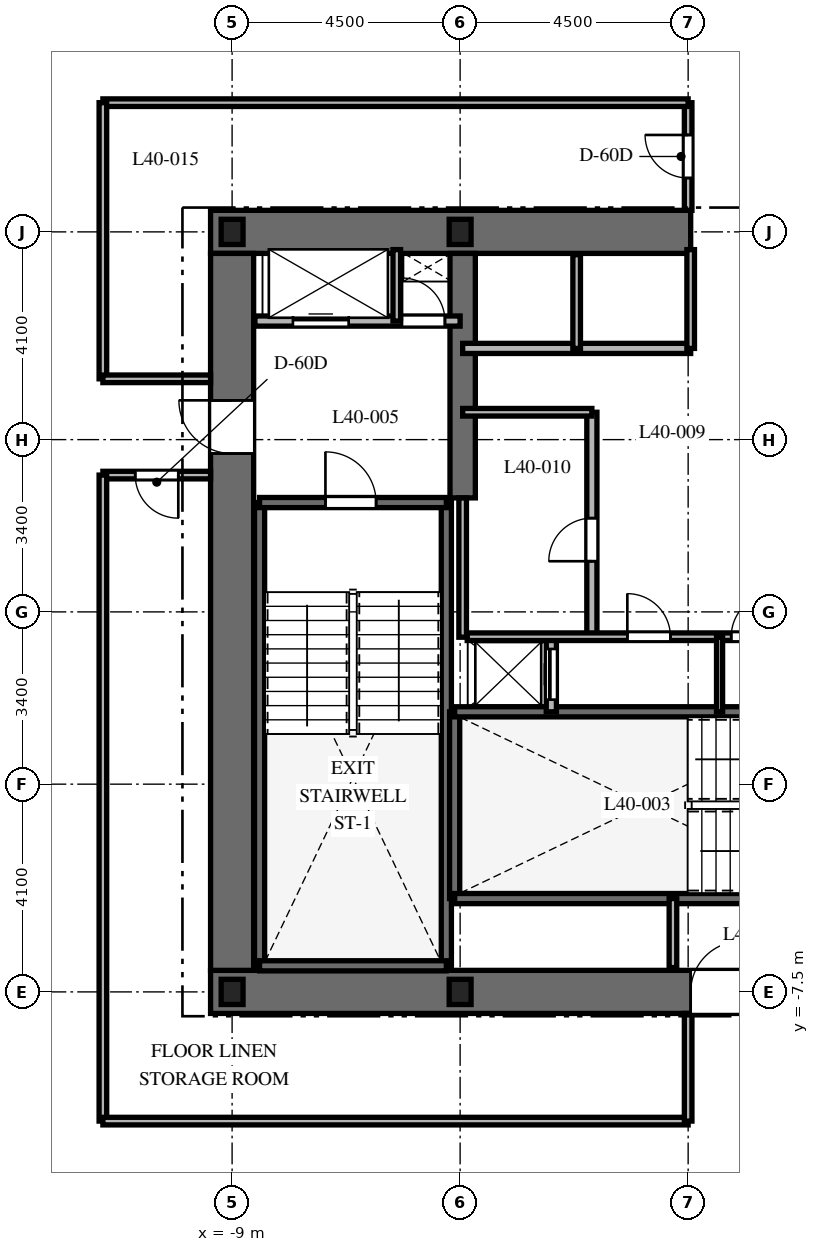
"""IFC4 building model, lengths in metres.
Left out: names, types, materials, properties, quantities, classifications, styles, units other than length and angle.
Written with IfcOpenShell. Run it as: python <this file> out.ifc"""

import sys

from ifc_helpers import new_model, si_unit, direction, frame, frame_2d, origin, origin_2d, place, context, subcontext, project, spatial, rectangle, i_section, extrude, element, fill, save


model = new_model("IFC4")
c1 = context("Model", 3, precision=1e-05, world=origin(), true_north=direction((0.0, 1.0)))
c2 = subcontext(c1, "Body", "Model", "MODEL_VIEW")
j1 = project(units=[si_unit("LENGTHUNIT", "METRE"), si_unit("PLANEANGLEUNIT", "RADIAN")], contexts=[c1])
p1 = place(None, origin())
s1 = spatial("IfcSite", under=j1, at=p1, CompositionType="ELEMENT")
p2 = place(p1, origin())
s2 = spatial("IfcBuilding", under=s1, at=p2, CompositionType="ELEMENT")
p3 = place(p2, frame((0.0, 0.0, 162.8)))
s3 = spatial("IfcBuildingStorey", under=s2, at=p3, CompositionType="ELEMENT", Elevation=162.8)
p4 = place(p3, frame((-9.425, -7.5, 0.0), z_axis=(0.0, 0.0, 1.0), x_axis=(1.0, 0.0, 0.0)))
e1 = element("IfcWall", 1, at=p4, inside=s3, PredefinedType="SHEAR", context=c2, shape_type="SweptSolid", body=[
    extrude(rectangle(XDim=18.85, YDim=0.85, at=frame_2d((9.425, 0.0))), origin(), (0.0, 0.0, 1.0), 3.7),
])
p5 = place(p4, frame((9.475, 0.0, 0.0)))
e2 = element("IfcOpeningElement", 2, at=p5, cuts=e1, PredefinedType="OPENING", context=c2, shape_type="SweptSolid", body=[
    extrude(rectangle(XDim=1.0, YDim=2.15, at=frame_2d((0.5, 1.075))), frame((0.0, 0.435, 0.0), z_axis=(0.0, -1.0, 0.0), x_axis=(1.0, 0.0, 0.0)), (0.0, 0.0, 1.0), 0.87),
])
p6 = place(p3, frame((-9.425, 7.5, 0.0), z_axis=(0.0, 0.0, 1.0), x_axis=(1.0, 0.0, 0.0)))
e3 = element("IfcWall", 3, at=p6, inside=s3, PredefinedType="SHEAR", context=c2, shape_type="SweptSolid", body=[
    extrude(rectangle(XDim=9.475, YDim=0.85, at=frame_2d((4.738, 0.0))), origin(), (0.0, 0.0, 1.0), 3.7),
])
p7 = place(p3, frame((-9.0, -7.075, 0.0), z_axis=(0.0, 0.0, 1.0), x_axis=(0.0, 1.0, 0.0)))
e4 = element("IfcWall", 4, at=p7, inside=s3, PredefinedType="SHEAR", context=c2, shape_type="SweptSolid", body=[
    extrude(rectangle(XDim=14.15, YDim=0.85, at=frame_2d((7.075, 0.0))), origin(), (0.0, 0.0, 1.0), 3.7),
])
p8 = place(p7, frame((10.2, 0.0, 0.0)))
e5 = element("IfcOpeningElement", 5, at=p8, cuts=e4, PredefinedType="OPENING", context=c2, shape_type="SweptSolid", body=[
    extrude(rectangle(XDim=1.05, YDim=2.15, at=frame_2d((0.525, 1.075))), frame((0.0, 0.435, 0.0), z_axis=(0.0, -1.0, 0.0), x_axis=(1.0, 0.0, 0.0)), (0.0, 0.0, 1.0), 0.87),
])
p9 = place(p3, frame((-4.45, 2.25, 0.0), z_axis=(0.0, 0.0, 1.0), x_axis=(0.0, 1.0, 0.0)))
e6 = element("IfcWall", 6, at=p9, inside=s3, PredefinedType="SHEAR", context=c2, shape_type="SweptSolid", body=[
    extrude(rectangle(XDim=4.825, YDim=0.5, at=frame_2d((2.413, 0.0))), origin(), (0.0, 0.0, 1.0), 3.7),
])
for number, where, z_axis, x_axis in (
    (7, (-8.458, -6.985, 0.0), (0.0, 0.0, 1.0), (0.0, 1.0, 0.0)),
    (8, (-4.772, -6.985, 0.0), (0.0, 0.0, 1.0), (0.0, 1.0, 0.0)),
):
    element("IfcWall", number, at=place(p3, frame(where, z_axis=z_axis, x_axis=x_axis)), inside=s3, PredefinedType="SHEAR", context=c2, shape_type="SweptSolid", body=[
        extrude(rectangle(XDim=9.143, YDim=0.2, at=frame_2d((4.572, 0.0))), origin(), (0.0, 0.0, 1.0), 3.7),
    ])
p10 = place(p3, frame((-8.458, -6.985, 0.0), z_axis=(0.0, 0.0, 1.0), x_axis=(1.0, 0.0, 0.0)))
e9 = element("IfcWall", 9, at=p10, inside=s3, PredefinedType="SHEAR", context=c2, shape_type="SweptSolid", body=[
    extrude(rectangle(XDim=3.686, YDim=0.2, at=frame_2d((1.843, 0.0))), origin(), (0.0, 0.0, 1.0), 3.7),
])
p11 = place(p3, frame((-8.458, 2.158, 0.0), z_axis=(0.0, 0.0, 1.0), x_axis=(1.0, 0.0, 0.0)))
e10 = element("IfcWall", 10, at=p11, inside=s3, PredefinedType="SHEAR", context=c2, shape_type="SweptSolid", body=[
    extrude(rectangle(XDim=3.686, YDim=0.2, at=frame_2d((1.843, 0.0))), origin(), (0.0, 0.0, 1.0), 3.7),
])
p12 = place(p11, frame((1.3, 0.0, 0.0)))
e11 = element("IfcOpeningElement", 11, at=p12, cuts=e10, PredefinedType="OPENING", context=c2, shape_type="SweptSolid", body=[
    extrude(rectangle(XDim=1.0, YDim=2.15, at=frame_2d((0.5, 1.075))), frame((0.0, 0.11, 0.0), z_axis=(0.0, -1.0, 0.0), x_axis=(1.0, 0.0, 0.0)), (0.0, 0.0, 1.0), 0.22),
])
p13 = place(p3, frame((-4.608, -5.658, 0.0), z_axis=(0.0, 0.0, 1.0), x_axis=(0.0, 1.0, 0.0)))
e12 = element("IfcWall", 12, at=p13, inside=s3, PredefinedType="SHEAR", context=c2, shape_type="SweptSolid", body=[
    extrude(rectangle(XDim=3.686, YDim=0.2, at=frame_2d((1.843, 0.0))), origin(), (0.0, 0.0, 1.0), 3.7),
])
p14 = place(p3, frame((-4.608, -5.658, 0.0), z_axis=(0.0, 0.0, 1.0), x_axis=(1.0, 0.0, 0.0)))
e13 = element("IfcWall", 13, at=p14, inside=s3, PredefinedType="SHEAR", context=c2, shape_type="SweptSolid", body=[
    extrude(rectangle(XDim=9.166, YDim=0.2, at=frame_2d((4.583, 0.0))), origin(), (0.0, 0.0, 1.0), 3.7),
])
p15 = place(p14, frame((7.45, 0.0, 0.0)))
e14 = element("IfcOpeningElement", 14, at=p15, cuts=e13, PredefinedType="OPENING", context=c2, shape_type="SweptSolid", body=[
    extrude(rectangle(XDim=1.0, YDim=2.15, at=frame_2d((0.5, 1.075))), frame((0.0, 0.11, 0.0), z_axis=(0.0, -1.0, 0.0), x_axis=(1.0, 0.0, 0.0)), (0.0, 0.0, 1.0), 0.22),
])
p16 = place(p3, frame((-4.608, -1.972, 0.0), z_axis=(0.0, 0.0, 1.0), x_axis=(1.0, 0.0, 0.0)))
e15 = element("IfcWall", 15, at=p16, inside=s3, PredefinedType="SHEAR", context=c2, shape_type="SweptSolid", body=[
    extrude(rectangle(XDim=9.166, YDim=0.2, at=frame_2d((4.583, 0.0))), origin(), (0.0, 0.0, 1.0), 3.7),
])
for number, where, z_axis, x_axis in (
    (16, (-9.0, -7.5, 0.0), (0.0, 0.0, 1.0), (1.0, 0.0, 0.0)),
    (17, (-4.5, -7.5, 0.0), (0.0, 0.0, 1.0), (1.0, 0.0, 0.0)),
    (18, (-4.5, 7.5, 0.0), (0.0, 0.0, 1.0), (1.0, 0.0, 0.0)),
    (19, (-9.0, 7.5, 0.0), (0.0, 0.0, 1.0), (1.0, 0.0, 0.0)),
):
    element("IfcColumn", number, at=place(p3, frame(where, z_axis=z_axis, x_axis=x_axis)), inside=s3, PredefinedType="COLUMN", context=c2, shape_type="SweptSolid", body=[
        extrude(i_section(OverallWidth=0.432, OverallDepth=0.498, WebThickness=0.056, FlangeThickness=0.089, at=origin_2d()), origin(), (0.0, 0.0, 1.0), 3.7),
    ])
p17 = place(p3, frame((-0.3, -7.02, 0.0), z_axis=(0.0, 0.0, 1.0), x_axis=(0.0, 1.0, 0.0)))
e20 = element("IfcWall", 20, at=p17, inside=s3, PredefinedType="PARTITIONING", context=c2, shape_type="SweptSolid", body=[
    extrude(rectangle(XDim=1.362, YDim=0.15, at=frame_2d((0.681, 0.0))), origin(), (0.0, 0.0, 1.0), 3.4),
])
p18 = place(p3, frame((-8.55, 5.74, 0.0), z_axis=(0.0, 0.0, 1.0), x_axis=(1.0, 0.0, 0.0)))
e21 = element("IfcWall", 21, at=p18, inside=s3, PredefinedType="PARTITIONING", context=c2, shape_type="SweptSolid", body=[
    extrude(rectangle(XDim=4.05, YDim=0.2, at=frame_2d((2.025, 0.0))), origin(), (0.0, 0.0, 1.0), 3.4),
])
p19 = place(p18, frame((0.75, 0.0, 0.0)))
e22 = element("IfcOpeningElement", 22, at=p19, cuts=e21, PredefinedType="OPENING", context=c2, shape_type="SweptSolid", body=[
    extrude(rectangle(XDim=1.1, YDim=2.2, at=frame_2d((0.55, 1.1))), frame((0.0, 0.11, 0.0), z_axis=(0.0, -1.0, 0.0), x_axis=(1.0, 0.0, 0.0)), (0.0, 0.0, 1.0), 0.22),
])
p20 = place(p18, frame((2.9, 0.0, 0.0)))
e23 = element("IfcOpeningElement", 23, at=p20, cuts=e21, PredefinedType="OPENING", context=c2, shape_type="SweptSolid", body=[
    extrude(rectangle(XDim=0.85, YDim=2.03, at=frame_2d((0.425, 1.015))), frame((0.0, 0.11, 0.0), z_axis=(0.0, -1.0, 0.0), x_axis=(1.0, 0.0, 0.0)), (0.0, 0.0, 1.0), 0.22),
])
p21 = place(p3, frame((-5.75, 5.74, 0.0), z_axis=(0.0, 0.0, 1.0), x_axis=(0.0, 1.0, 0.0)))
e24 = element("IfcWall", 24, at=p21, inside=s3, PredefinedType="PARTITIONING", context=c2, shape_type="SweptSolid", body=[
    extrude(rectangle(XDim=1.41, YDim=0.15, at=frame_2d((0.705, 0.0))), origin(), (0.0, 0.0, 1.0), 3.4),
])
p22 = place(p3, frame((-2.7, -1.972, 0.0), z_axis=(0.0, 0.0, 1.0), x_axis=(0.0, 1.0, 0.0)))
e25 = element("IfcWall", 25, at=p22, inside=s3, PredefinedType="PARTITIONING", context=c2, shape_type="SweptSolid", body=[
    extrude(rectangle(XDim=1.472, YDim=0.2, at=frame_2d((0.736, 0.0))), origin(), (0.0, 0.0, 1.0), 3.4),
])
p23 = place(p22, frame((0.24, 0.0, 0.0)))
e26 = element("IfcOpeningElement", 26, at=p23, cuts=e25, PredefinedType="OPENING", context=c2, shape_type="SweptSolid", body=[
    extrude(rectangle(XDim=1.0, YDim=2.2, at=frame_2d((0.5, 1.1))), frame((0.0, 0.11, 0.0), z_axis=(0.0, -1.0, 0.0), x_axis=(1.0, 0.0, 0.0)), (0.0, 0.0, 1.0), 0.22),
])
p24 = place(p3, frame((-4.45, 5.2, 0.0), z_axis=(0.0, 0.0, 1.0), x_axis=(1.0, 0.0, 0.0)))
e27 = element("IfcWall", 27, at=p24, inside=s3, PredefinedType="PARTITIONING", context=c2, shape_type="SweptSolid", body=[
    extrude(rectangle(XDim=4.5, YDim=0.2, at=frame_2d((2.25, 0.0))), origin(), (0.0, 0.0, 1.0), 3.4),
])
p25 = place(p3, frame((-2.2, 5.2, 0.0), z_axis=(0.0, 0.0, 1.0), x_axis=(0.0, 1.0, 0.0)))
e28 = element("IfcWall", 28, at=p25, inside=s3, PredefinedType="PARTITIONING", context=c2, shape_type="SweptSolid", body=[
    extrude(rectangle(XDim=1.85, YDim=0.15, at=frame_2d((0.925, 0.0))), origin(), (0.0, 0.0, 1.0), 3.4),
])
p26 = place(p3, frame((0.05, 5.2, 0.0), z_axis=(0.0, 0.0, 1.0), x_axis=(0.0, 1.0, 0.0)))
e29 = element("IfcWall", 29, at=p26, inside=s3, PredefinedType="PARTITIONING", context=c2, shape_type="SweptSolid", body=[
    extrude(rectangle(XDim=1.95, YDim=0.15, at=frame_2d((0.975, 0.0))), origin(), (0.0, 0.0, 1.0), 3.4),
])
p27 = place(p3, frame((-4.45, -0.5, 0.0), z_axis=(0.0, 0.0, 1.0), x_axis=(0.0, 1.0, 0.0)))
e30 = element("IfcWall", 30, at=p27, inside=s3, PredefinedType="PARTITIONING", context=c2, shape_type="SweptSolid", body=[
    extrude(rectangle(XDim=2.75, YDim=0.15, at=frame_2d((1.375, 0.0))), origin(), (0.0, 0.0, 1.0), 3.4),
])
p28 = place(p3, frame((-1.9, -0.5, 0.0), z_axis=(0.0, 0.0, 1.0), x_axis=(0.0, 1.0, 0.0)))
e31 = element("IfcWall", 31, at=p28, inside=s3, PredefinedType="PARTITIONING", context=c2, shape_type="SweptSolid", body=[
    extrude(rectangle(XDim=4.44, YDim=0.2, at=frame_2d((2.22, 0.0))), origin(), (0.0, 0.0, 1.0), 3.4),
])
p29 = place(p28, frame((1.5, 0.0, 0.0)))
e32 = element("IfcOpeningElement", 32, at=p29, cuts=e31, PredefinedType="OPENING", context=c2, shape_type="SweptSolid", body=[
    extrude(rectangle(XDim=0.85, YDim=2.03, at=frame_2d((0.425, 1.015))), frame((0.0, 0.11, 0.0), z_axis=(0.0, -1.0, 0.0), x_axis=(1.0, 0.0, 0.0)), (0.0, 0.0, 1.0), 0.22),
])
p30 = place(p3, frame((-4.45, 3.94, 0.0), z_axis=(0.0, 0.0, 1.0), x_axis=(1.0, 0.0, 0.0)))
e33 = element("IfcWall", 33, at=p30, inside=s3, PredefinedType="PARTITIONING", context=c2, shape_type="SweptSolid", body=[
    extrude(rectangle(XDim=2.55, YDim=0.15, at=frame_2d((1.275, 0.0))), origin(), (0.0, 0.0, 1.0), 3.4),
])
p31 = place(p3, frame((-4.36, -0.49, 0.0), z_axis=(0.0, 0.0, 1.0), x_axis=(1.0, 0.0, 0.0)))
e34 = element("IfcWall", 34, at=p31, inside=s3, PredefinedType="PARTITIONING", context=c2, shape_type="SweptSolid", body=[
    extrude(rectangle(XDim=8.72, YDim=0.15, at=frame_2d((4.36, 0.0))), origin(), (0.0, 0.0, 1.0), 3.4),
])
p32 = place(p31, frame((3.16, 0.0, 0.0)))
e35 = element("IfcOpeningElement", 35, at=p32, cuts=e34, PredefinedType="OPENING", context=c2, shape_type="SweptSolid", body=[
    extrude(rectangle(XDim=0.85, YDim=2.03, at=frame_2d((0.425, 1.015))), frame((0.0, 0.085, 0.0), z_axis=(0.0, -1.0, 0.0), x_axis=(1.0, 0.0, 0.0)), (0.0, 0.0, 1.0), 0.17),
])
p33 = place(p31, frame((5.21, 0.0, 0.0)))
e36 = element("IfcOpeningElement", 36, at=p33, cuts=e34, PredefinedType="OPENING", context=c2, shape_type="SweptSolid", body=[
    extrude(rectangle(XDim=0.85, YDim=2.03, at=frame_2d((0.425, 1.015))), frame((0.0, 0.085, 0.0), z_axis=(0.0, -1.0, 0.0), x_axis=(1.0, 0.0, 0.0)), (0.0, 0.0, 1.0), 0.17),
])
p34 = place(p3, frame((0.62, -1.972, 0.0), z_axis=(0.0, 0.0, 1.0), x_axis=(0.0, 1.0, 0.0)))
e37 = element("IfcWall", 37, at=p34, inside=s3, PredefinedType="PARTITIONING", context=c2, shape_type="SweptSolid", body=[
    extrude(rectangle(XDim=1.472, YDim=0.12, at=frame_2d((0.736, 0.0))), origin(), (0.0, 0.0, 1.0), 3.4),
])
p35 = place(p3, frame((0.0, 7.925, 0.0), z_axis=(0.0, 0.0, 1.0), x_axis=(0.0, 1.0, 0.0)))
e38 = element("IfcWall", 38, at=p35, inside=s3, PredefinedType="PARTITIONING", context=c2, shape_type="SweptSolid", body=[
    extrude(rectangle(XDim=2.125, YDim=0.15, at=frame_2d((1.062, 0.0))), origin(), (0.0, 0.0, 1.0), 3.4),
])
p36 = place(p35, frame((0.638, 0.0, 0.0)))
e39 = element("IfcOpeningElement", 39, at=p36, cuts=e38, PredefinedType="OPENING", context=c2, shape_type="SweptSolid", body=[
    extrude(rectangle(XDim=0.85, YDim=2.03, at=frame_2d((0.425, 1.015))), frame((0.0, 0.085, 0.0), z_axis=(0.0, -1.0, 0.0), x_axis=(1.0, 0.0, 0.0)), (0.0, 0.0, 1.0), 0.17),
])
p37 = place(p3, frame((0.0, 10.05, 0.0), z_axis=(0.0, 0.0, 1.0), x_axis=(-1.0, 0.0, 0.0)))
e40 = element("IfcWall", 40, at=p37, inside=s3, PredefinedType="PARTITIONING", context=c2, shape_type="SweptSolid", body=[
    extrude(rectangle(XDim=11.55, YDim=0.15, at=frame_2d((5.775, 0.0))), origin(), (0.0, 0.0, 1.0), 2.84),
])
p38 = place(p3, frame((-11.55, 10.05, 0.0), z_axis=(0.0, 0.0, 1.0), x_axis=(0.0, -1.0, 0.0)))
e41 = element("IfcWall", 41, at=p38, inside=s3, PredefinedType="PARTITIONING", context=c2, shape_type="SweptSolid", body=[
    extrude(rectangle(XDim=5.45, YDim=0.15, at=frame_2d((2.725, 0.0))), origin(), (0.0, 0.0, 1.0), 2.84),
])
p39 = place(p3, frame((-11.55, 4.6, 0.0), z_axis=(0.0, 0.0, 1.0), x_axis=(1.0, 0.0, 0.0)))
e42 = element("IfcWall", 42, at=p39, inside=s3, PredefinedType="PARTITIONING", context=c2, shape_type="SweptSolid", body=[
    extrude(rectangle(XDim=2.125, YDim=0.15, at=frame_2d((1.062, 0.0))), origin(), (0.0, 0.0, 1.0), 3.4),
])
p40 = place(p3, frame((-9.425, 2.7, 0.0), z_axis=(0.0, 0.0, 1.0), x_axis=(-1.0, 0.0, 0.0)))
e43 = element("IfcWall", 43, at=p40, inside=s3, PredefinedType="PARTITIONING", context=c2, shape_type="SweptSolid", body=[
    extrude(rectangle(XDim=2.125, YDim=0.15, at=frame_2d((1.062, 0.0))), origin(), (0.0, 0.0, 1.0), 3.4),
])
p41 = place(p40, frame((0.637, 0.0, 0.0)))
e44 = element("IfcOpeningElement", 44, at=p41, cuts=e43, PredefinedType="OPENING", context=c2, shape_type="SweptSolid", body=[
    extrude(rectangle(XDim=0.85, YDim=2.03, at=frame_2d((0.425, 1.015))), frame((0.0, 0.085, 0.0), z_axis=(0.0, -1.0, 0.0), x_axis=(1.0, 0.0, 0.0)), (0.0, 0.0, 1.0), 0.17),
])
p42 = place(p3, frame((-11.55, 2.7, 0.0), z_axis=(0.0, 0.0, 1.0), x_axis=(0.0, -1.0, 0.0)))
e45 = element("IfcWall", 45, at=p42, inside=s3, PredefinedType="PARTITIONING", context=c2, shape_type="SweptSolid", body=[
    extrude(rectangle(XDim=12.75, YDim=0.15, at=frame_2d((6.375, 0.0))), origin(), (0.0, 0.0, 1.0), 2.84),
])
p43 = place(p3, frame((-11.55, -10.05, 0.0), z_axis=(0.0, 0.0, 1.0), x_axis=(1.0, 0.0, 0.0)))
e46 = element("IfcWall", 46, at=p43, inside=s3, PredefinedType="PARTITIONING", context=c2, shape_type="SweptSolid", body=[
    extrude(rectangle(XDim=11.55, YDim=0.15, at=frame_2d((5.775, 0.0))), origin(), (0.0, 0.0, 1.0), 2.84),
])
p44 = place(p3, frame((0.0, -10.05, 0.0), z_axis=(0.0, 0.0, 1.0), x_axis=(0.0, 1.0, 0.0)))
e47 = element("IfcWall", 47, at=p44, inside=s3, PredefinedType="PARTITIONING", context=c2, shape_type="SweptSolid", body=[
    extrude(rectangle(XDim=2.125, YDim=0.15, at=frame_2d((1.062, 0.0))), origin(), (0.0, 0.0, 1.0), 3.4),
])
p45 = place(p12, origin())
e48 = element("IfcDoor", 48, at=p45, inside=s3, OperationType="SINGLE_SWING_LEFT", PredefinedType="DOOR", context=c2, shape_type="SweptSolid", body=[
    extrude(rectangle(XDim=1.0, YDim=2.15, at=frame_2d((0.5, 1.075))), frame((0.0, 0.025, 0.0), z_axis=(0.0, -1.0, 0.0), x_axis=(1.0, 0.0, 0.0)), (0.0, 0.0, 1.0), 0.05),
])
fill(e11, e48)
p46 = place(p5, origin())
e49 = element("IfcDoor", 49, at=p46, inside=s3, OperationType="SINGLE_SWING_RIGHT", PredefinedType="DOOR", context=c2, shape_type="SweptSolid", body=[
    extrude(rectangle(XDim=1.0, YDim=2.15, at=frame_2d((0.5, 1.075))), frame((0.0, 0.025, 0.0), z_axis=(0.0, -1.0, 0.0), x_axis=(1.0, 0.0, 0.0)), (0.0, 0.0, 1.0), 0.05),
])
fill(e2, e49)
p47 = place(p8, origin())
e50 = element("IfcDoor", 50, at=p47, inside=s3, OperationType="SINGLE_SWING_RIGHT", PredefinedType="DOOR", context=c2, shape_type="SweptSolid", body=[
    extrude(rectangle(XDim=1.05, YDim=2.15, at=frame_2d((0.525, 1.075))), frame((0.0, 0.025, 0.0), z_axis=(0.0, -1.0, 0.0), x_axis=(1.0, 0.0, 0.0)), (0.0, 0.0, 1.0), 0.05),
])
fill(e5, e50)
p48 = place(p19, origin())
e51 = element("IfcDoor", 51, at=p48, inside=s3, OperationType="SLIDING_TO_LEFT", PredefinedType="DOOR", context=c2, shape_type="SweptSolid", body=[
    extrude(rectangle(XDim=1.1, YDim=2.2, at=frame_2d((0.55, 1.1))), frame((0.0, 0.025, 0.0), z_axis=(0.0, -1.0, 0.0), x_axis=(1.0, 0.0, 0.0)), (0.0, 0.0, 1.0), 0.05),
])
fill(e22, e51)
p49 = place(p20, origin())
e52 = element("IfcDoor", 52, at=p49, inside=s3, OperationType="SINGLE_SWING_LEFT", PredefinedType="DOOR", context=c2, shape_type="SweptSolid", body=[
    extrude(rectangle(XDim=0.85, YDim=2.03, at=frame_2d((0.425, 1.015))), frame((0.0, 0.025, 0.0), z_axis=(0.0, -1.0, 0.0), x_axis=(1.0, 0.0, 0.0)), (0.0, 0.0, 1.0), 0.05),
])
fill(e23, e52)
p50 = place(p23, origin())
e53 = element("IfcDoor", 53, at=p50, inside=s3, OperationType="SLIDING_TO_LEFT", PredefinedType="DOOR", context=c2, shape_type="SweptSolid", body=[
    extrude(rectangle(XDim=1.0, YDim=2.2, at=frame_2d((0.5, 1.1))), frame((0.0, 0.025, 0.0), z_axis=(0.0, -1.0, 0.0), x_axis=(1.0, 0.0, 0.0)), (0.0, 0.0, 1.0), 0.05),
])
fill(e26, e53)
p51 = place(p29, origin())
e54 = element("IfcDoor", 54, at=p51, inside=s3, OperationType="SINGLE_SWING_LEFT", PredefinedType="DOOR", context=c2, shape_type="SweptSolid", body=[
    extrude(rectangle(XDim=0.85, YDim=2.03, at=frame_2d((0.425, 1.015))), frame((0.0, 0.025, 0.0), z_axis=(0.0, -1.0, 0.0), x_axis=(1.0, 0.0, 0.0)), (0.0, 0.0, 1.0), 0.05),
])
fill(e32, e54)
p52 = place(p32, origin())
e55 = element("IfcDoor", 55, at=p52, inside=s3, OperationType="SINGLE_SWING_LEFT", PredefinedType="DOOR", context=c2, shape_type="SweptSolid", body=[
    extrude(rectangle(XDim=0.85, YDim=2.03, at=frame_2d((0.425, 1.015))), frame((0.0, 0.025, 0.0), z_axis=(0.0, -1.0, 0.0), x_axis=(1.0, 0.0, 0.0)), (0.0, 0.0, 1.0), 0.05),
])
fill(e35, e55)
p53 = place(p33, origin())
e56 = element("IfcDoor", 56, at=p53, inside=s3, OperationType="SINGLE_SWING_RIGHT", PredefinedType="DOOR", context=c2, shape_type="SweptSolid", body=[
    extrude(rectangle(XDim=0.85, YDim=2.03, at=frame_2d((0.425, 1.015))), frame((0.0, 0.025, 0.0), z_axis=(0.0, -1.0, 0.0), x_axis=(1.0, 0.0, 0.0)), (0.0, 0.0, 1.0), 0.05),
])
fill(e36, e56)
p54 = place(p41, origin())
e57 = element("IfcDoor", 57, at=p54, inside=s3, OperationType="SINGLE_SWING_LEFT", PredefinedType="DOOR", context=c2, shape_type="SweptSolid", body=[
    extrude(rectangle(XDim=0.85, YDim=2.03, at=frame_2d((0.425, 1.015))), frame((0.0, 0.025, 0.0), z_axis=(0.0, -1.0, 0.0), x_axis=(1.0, 0.0, 0.0)), (0.0, 0.0, 1.0), 0.05),
])
fill(e44, e57)
p55 = place(p36, origin())
e58 = element("IfcDoor", 58, at=p55, inside=s3, OperationType="SINGLE_SWING_RIGHT", PredefinedType="DOOR", context=c2, shape_type="SweptSolid", body=[
    extrude(rectangle(XDim=0.85, YDim=2.03, at=frame_2d((0.425, 1.015))), frame((0.0, 0.025, 0.0), z_axis=(0.0, -1.0, 0.0), x_axis=(1.0, 0.0, 0.0)), (0.0, 0.0, 1.0), 0.05),
])
fill(e39, e58)
save(model, sys.argv[1])
